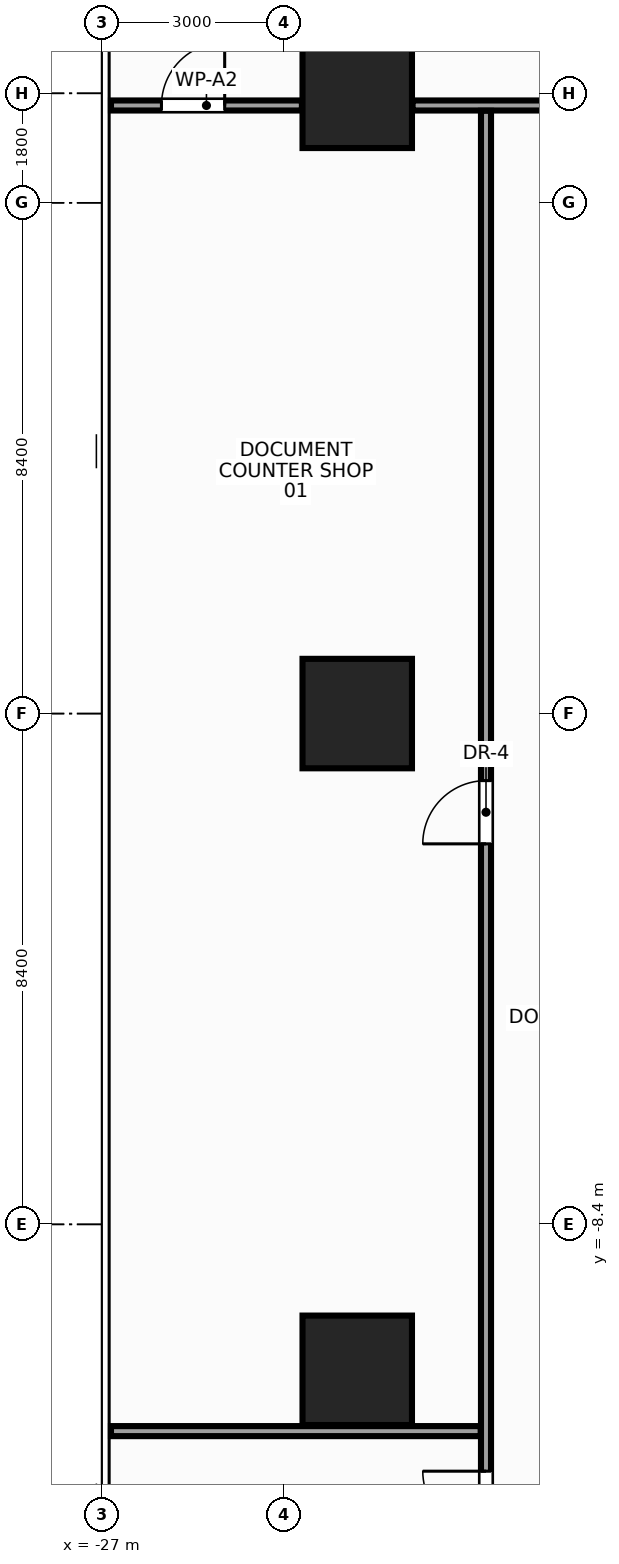
"""IFC4 building model, lengths in metres.
Left out: names, types, materials, properties, quantities, classifications, styles, units other than length and angle.
Written with IfcOpenShell. Run it as: python <this file> out.ifc"""

import sys

from ifc_helpers import new_model, si_unit, direction, frame, frame_2d, origin, origin_2d, place, context, subcontext, project, spatial, rectangle, extrude, source, transform, mapped, element, fill, save


model = new_model("IFC4")
c1 = context("Model", 3, precision=1e-05, world=origin(), true_north=direction((0.0, 1.0)))
c2 = subcontext(c1, "Body", "Model", "MODEL_VIEW")
j1 = project(units=[si_unit("LENGTHUNIT", "METRE"), si_unit("PLANEANGLEUNIT", "RADIAN")], contexts=[c1])
p1 = place(None, origin())
s1 = spatial("IfcSite", under=j1, at=p1, CompositionType="ELEMENT")
p2 = place(p1, origin())
s2 = spatial("IfcBuilding", under=s1, at=p2, CompositionType="ELEMENT")
p3 = place(p2, frame((0.0, 0.0, 56.0)))
s3 = spatial("IfcBuildingStorey", under=s2, at=p3, CompositionType="ELEMENT", Elevation=56.0)
m1 = source(origin(), c2, "Body", "SweptSolid", [
    extrude(rectangle(XDim=1.8, YDim=1.8, at=origin_2d()), origin(), (0.0, 0.0, 1.0), 3.6),
])
for number, where, z_axis, x_axis in (
    (1, (-22.8, -10.8, 0.0), (0.0, 0.0, 1.0), (1.0, 0.0, 0.0)),
    (2, (-22.8, 0.0, 0.0), (0.0, 0.0, 1.0), (1.0, 0.0, 0.0)),
    (3, (-22.8, 10.2, 0.0), (0.0, 0.0, 1.0), (1.0, 0.0, 0.0)),
):
    element("IfcColumn", number, at=place(p3, frame(where, z_axis=z_axis, x_axis=x_axis)), inside=s3, PredefinedType="COLUMN", context=c2, shape_type="MappedRepresentation", body=[
        mapped(m1, transform((0.0, 0.0, 0.0), x_axis=(1.0, 0.0, 0.0), y_axis=(0.0, 1.0, 0.0), z_axis=(0.0, 0.0, 1.0), scale=1.0)),
    ])
m2 = source(origin(), c2, "Body", "SweptSolid", [
    extrude(rectangle(XDim=3.14, YDim=0.165, at=frame_2d((1.57, 0.0))), origin(), (0.0, 0.0, 1.0), 2.435),
])
p4 = place(p3, frame((-26.85, 10.0, 0.0), z_axis=(0.0, 0.0, 1.0), x_axis=(1.0, 0.0, 0.0)))
e4 = element("IfcWall", 4, at=p4, inside=s3, PredefinedType="PARTITIONING", context=c2, shape_type="MappedRepresentation", body=[
    mapped(m2, transform((0.0, 0.0, 0.0), x_axis=(1.0, 0.0, 0.0), y_axis=(0.0, 1.0, 0.0), z_axis=(0.0, 0.0, 1.0), scale=1.0)),
])
p5 = place(p4, frame((0.83, 0.0, 0.0)))
e5 = element("IfcOpeningElement", 5, at=p5, cuts=e4, PredefinedType="OPENING", context=c2, shape_type="SweptSolid", body=[
    extrude(rectangle(XDim=1.04, YDim=2.2, at=frame_2d((0.52, 1.1))), frame((0.0, 0.094, 0.0), z_axis=(0.0, -1.0, 0.0), x_axis=(1.0, 0.0, 0.0)), (0.0, 0.0, 1.0), 0.189),
])
m3 = source(origin(), c2, "Body", "SweptSolid", [
    extrude(rectangle(XDim=4.18, YDim=0.165, at=frame_2d((2.09, 0.0))), origin(), (0.0, 0.0, 1.0), 2.745),
])
p6 = place(p3, frame((-21.89, 10.0, 0.0), z_axis=(0.0, 0.0, 1.0), x_axis=(1.0, 0.0, 0.0)))
e6 = element("IfcWall", 6, at=p6, inside=s3, PredefinedType="PARTITIONING", context=c2, shape_type="MappedRepresentation", body=[
    mapped(m3, transform((0.0, 0.0, 0.0), x_axis=(1.0, 0.0, 0.0), y_axis=(0.0, 1.0, 0.0), z_axis=(0.0, 0.0, 1.0), scale=1.0)),
])
m4 = source(origin(), c2, "Body", "SweptSolid", [
    extrude(rectangle(XDim=24.108, YDim=0.165, at=frame_2d((12.054, 0.0))), origin(), (0.0, 0.0, 1.0), 2.745),
])
p7 = place(p3, frame((-20.683, -14.195, 0.0), z_axis=(0.0, 0.0, 1.0), x_axis=(0.0, 1.0, 0.0)))
e7 = element("IfcWall", 7, at=p7, inside=s3, PredefinedType="PARTITIONING", context=c2, shape_type="MappedRepresentation", body=[
    mapped(m4, transform((0.0, 0.0, 0.0), x_axis=(1.0, 0.0, 0.0), y_axis=(0.0, 1.0, 0.0), z_axis=(0.0, 0.0, 1.0), scale=1.0)),
])
p8 = place(p7, frame((12.052, 0.0, 0.0)))
e8 = element("IfcOpeningElement", 8, at=p8, cuts=e7, PredefinedType="OPENING", context=c2, shape_type="SweptSolid", body=[
    extrude(rectangle(XDim=1.04, YDim=2.2, at=frame_2d((0.52, 1.1))), frame((0.0, 0.094, 0.0), z_axis=(0.0, -1.0, 0.0), x_axis=(1.0, 0.0, 0.0)), (0.0, 0.0, 1.0), 0.189),
])
p9 = place(p7, frame((0.696, 0.0, 0.0)))
e9 = element("IfcOpeningElement", 9, at=p9, cuts=e7, PredefinedType="OPENING", context=c2, shape_type="SweptSolid", body=[
    extrude(rectangle(XDim=1.04, YDim=2.2, at=frame_2d((0.52, 1.1))), frame((0.0, 0.094, 0.0), z_axis=(0.0, -1.0, 0.0), x_axis=(1.0, 0.0, 0.0)), (0.0, 0.0, 1.0), 0.189),
])
m5 = source(origin(), c2, "Body", "SweptSolid", [
    extrude(rectangle(XDim=6.08, YDim=0.165, at=frame_2d((3.04, 0.0))), origin(), (0.0, 0.0, 1.0), 2.945),
])
p10 = place(p3, frame((-26.85, -11.8, 0.0), z_axis=(0.0, 0.0, 1.0), x_axis=(1.0, 0.0, 0.0)))
e10 = element("IfcWall", 10, at=p10, inside=s3, PredefinedType="PARTITIONING", context=c2, shape_type="MappedRepresentation", body=[
    mapped(m5, transform((0.0, 0.0, 0.0), x_axis=(1.0, 0.0, 0.0), y_axis=(0.0, 1.0, 0.0), z_axis=(0.0, 0.0, 1.0), scale=1.0)),
])
m6 = source(origin(), c2, "Body", "SweptSolid", [
    extrude(rectangle(XDim=1.04, YDim=2.2, at=frame_2d((0.52, 1.1))), frame((0.0, 0.025, 0.0), z_axis=(0.0, -1.0, 0.0), x_axis=(1.0, 0.0, 0.0)), (0.0, 0.0, 1.0), 0.05),
])
p11 = place(p8, origin())
e11 = element("IfcDoor", 11, at=p11, inside=s3, OperationType="SINGLE_SWING_LEFT", PredefinedType="DOOR", context=c2, shape_type="MappedRepresentation", body=[
    mapped(m6, transform((0.0, 0.0, 0.0), x_axis=(1.0, 0.0, 0.0), y_axis=(0.0, 1.0, 0.0), z_axis=(0.0, 0.0, 1.0), scale=1.0)),
])
fill(e8, e11)
p12 = place(p9, origin())
e12 = element("IfcDoor", 12, at=p12, inside=s3, OperationType="SINGLE_SWING_RIGHT", PredefinedType="DOOR", context=c2, shape_type="MappedRepresentation", body=[
    mapped(m6, transform((0.0, 0.0, 0.0), x_axis=(1.0, 0.0, 0.0), y_axis=(0.0, 1.0, 0.0), z_axis=(0.0, 0.0, 1.0), scale=1.0)),
])
fill(e9, e12)
p13 = place(p5, origin())
e13 = element("IfcDoor", 13, at=p13, inside=s3, OperationType="SINGLE_SWING_RIGHT", PredefinedType="DOOR", context=c2, shape_type="MappedRepresentation", body=[
    mapped(m6, transform((0.0, 0.0, 0.0), x_axis=(1.0, 0.0, 0.0), y_axis=(0.0, 1.0, 0.0), z_axis=(0.0, 0.0, 1.0), scale=1.0)),
])
fill(e5, e13)
save(model, sys.argv[1])
